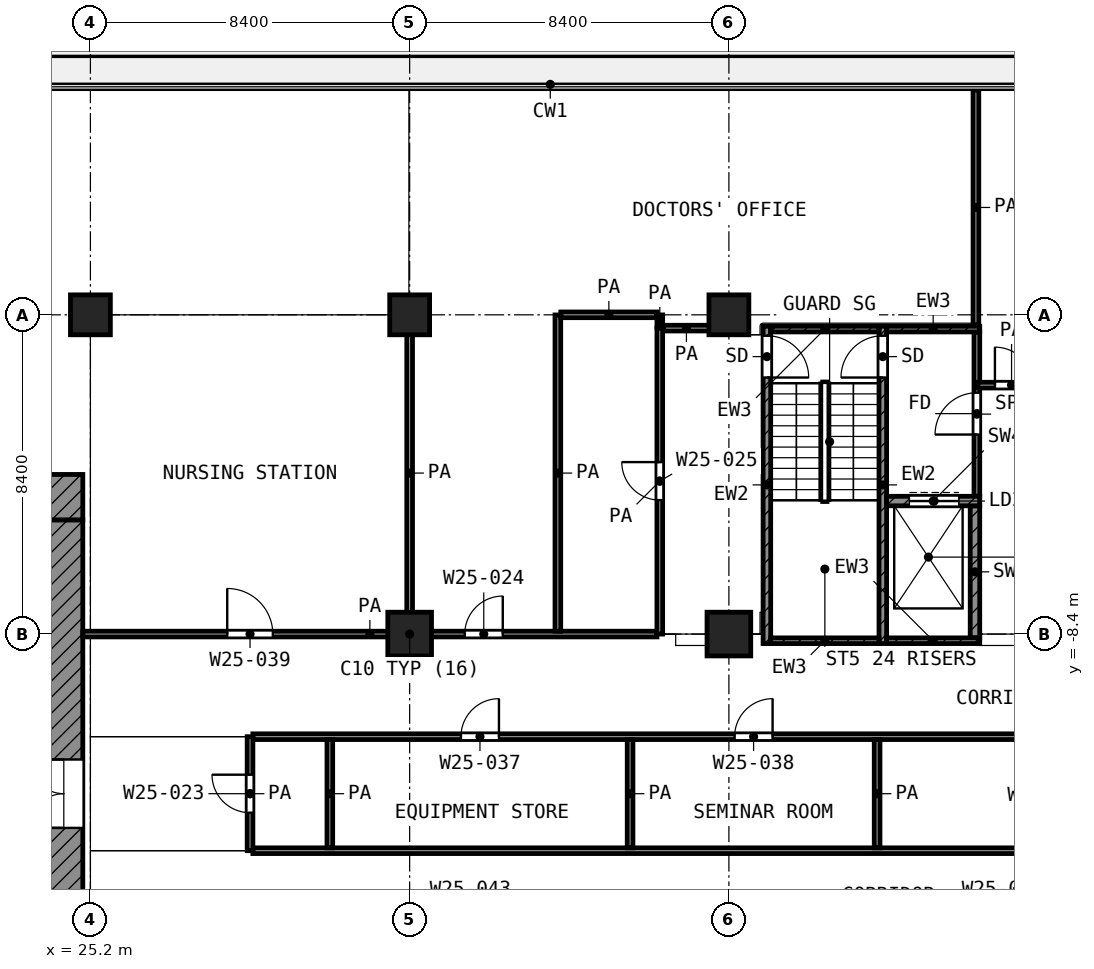
"""IFC4 building model, lengths in metres.
Left out: names, types, materials, properties, quantities, classifications, styles, units other than length and angle.
Written with IfcOpenShell. Run it as: python <this file> out.ifc"""

import sys

from ifc_helpers import new_model, si_unit, direction, frame, frame_2d, origin, origin_2d, place, context, subcontext, project, spatial, rectangle, extrude, element, fill, save


model = new_model("IFC4")
c1 = context("Model", 3, precision=1e-05, world=origin(), true_north=direction((0.0, 1.0)))
c2 = subcontext(c1, "Body", "Model", "MODEL_VIEW")
j1 = project(units=[si_unit("LENGTHUNIT", "METRE"), si_unit("PLANEANGLEUNIT", "RADIAN")], contexts=[c1])
p1 = place(None, origin())
s1 = spatial("IfcSite", under=j1, at=p1, CompositionType="ELEMENT")
p2 = place(p1, origin())
s2 = spatial("IfcBuilding", under=s1, at=p2, CompositionType="ELEMENT")
p3 = place(p2, frame((0.0, 0.0, 111.4)))
s3 = spatial("IfcBuildingStorey", under=s2, at=p3, CompositionType="ELEMENT", Elevation=111.4)
for number, where, z_axis, x_axis in (
    (1, (25.2, 0.0, 0.0), (0.0, 0.0, 1.0), (1.0, 0.0, 0.0)),
    (2, (33.6, 0.0, 0.0), (0.0, 0.0, 1.0), (1.0, 0.0, 0.0)),
    (3, (42.0, 0.0, 0.0), (0.0, 0.0, 1.0), (1.0, 0.0, 0.0)),
):
    element("IfcColumn", number, at=place(p3, frame(where, z_axis=z_axis, x_axis=x_axis)), inside=s3, PredefinedType="COLUMN", context=c2, shape_type="SweptSolid", body=[
        extrude(rectangle(XDim=1.05, YDim=1.05, at=origin_2d()), origin(), (0.0, 0.0, 1.0), 4.2),
    ])
for number, where, z_axis, x_axis in (
    (4, (33.6, -8.4, 0.0), (0.0, 0.0, 1.0), (1.0, 0.0, 0.0)),
    (5, (42.0, -8.4, 0.0), (0.0, 0.0, 1.0), (1.0, 0.0, 0.0)),
):
    element("IfcColumn", number, at=place(p3, frame(where, z_axis=z_axis, x_axis=x_axis)), inside=s3, PredefinedType="COLUMN", context=c2, shape_type="SweptSolid", body=[
        extrude(rectangle(XDim=1.15, YDim=1.15, at=origin_2d()), origin(), (0.0, 0.0, 1.0), 4.2),
    ])
p4 = place(p3, frame((4.2, -4.8, 0.0), z_axis=(0.0, 0.0, 1.0), x_axis=(1.0, 0.0, 0.0)))
e6 = element("IfcWall", 6, at=p4, inside=s3, PredefinedType="SHEAR", context=c2, shape_type="SweptSolid", body=[
    extrude(rectangle(XDim=20.8, YDim=1.2, at=frame_2d((10.4, 0.0))), origin(), (0.0, 0.0, 1.0), 3.6),
])
p5 = place(p4, frame((1.95, 0.0, 0.0)))
e7 = element("IfcOpeningElement", 7, at=p5, cuts=e6, PredefinedType="OPENING", context=c2, shape_type="SweptSolid", body=[
    extrude(rectangle(XDim=1.1, YDim=2.1, at=frame_2d((0.55, 1.05))), frame((0.0, 0.61, 0.0), z_axis=(0.0, -1.0, 0.0), x_axis=(1.0, 0.0, 0.0)), (0.0, 0.0, 1.0), 1.22),
])
p6 = place(p4, frame((17.95, 0.0, 0.0)))
e8 = element("IfcOpeningElement", 8, at=p6, cuts=e6, PredefinedType="OPENING", context=c2, shape_type="SweptSolid", body=[
    extrude(rectangle(XDim=1.1, YDim=2.1, at=frame_2d((0.55, 1.05))), frame((0.0, 0.61, 0.0), z_axis=(0.0, -1.0, 0.0), x_axis=(1.0, 0.0, 0.0)), (0.0, 0.0, 1.0), 1.22),
])
p7 = place(p3, frame((24.5, -24.0, 0.0), z_axis=(0.0, 0.0, 1.0), x_axis=(0.0, 1.0, 0.0)))
e9 = element("IfcWall", 9, at=p7, inside=s3, PredefinedType="SHEAR", context=c2, shape_type="SweptSolid", body=[
    extrude(rectangle(XDim=18.6, YDim=1.0, at=frame_2d((9.3, 0.0))), origin(), (0.0, 0.0, 1.0), 3.6),
])
p8 = place(p7, frame((10.5, 0.0, 0.0)))
e10 = element("IfcOpeningElement", 10, at=p8, cuts=e9, PredefinedType="OPENING", context=c2, shape_type="SweptSolid", body=[
    extrude(rectangle(XDim=1.8, YDim=2.1, at=frame_2d((0.9, 1.05))), frame((0.0, 0.51, 0.0), z_axis=(0.0, -1.0, 0.0), x_axis=(1.0, 0.0, 0.0)), (0.0, 0.0, 1.0), 1.02),
])
p9 = place(p3, frame((43.0, -8.65, 0.0), z_axis=(0.0, 0.0, 1.0), x_axis=(0.0, 1.0, 0.0)))
e11 = element("IfcWall", 11, at=p9, inside=s3, PredefinedType="SHEAR", context=c2, shape_type="SweptSolid", body=[
    extrude(rectangle(XDim=8.35, YDim=0.2, at=frame_2d((4.175, 0.0))), origin(), (0.0, 0.0, 1.0), 3.6),
])
p10 = place(p9, frame((7.0, 0.0, 0.0)))
e12 = element("IfcOpeningElement", 12, at=p10, cuts=e11, PredefinedType="OPENING", context=c2, shape_type="SweptSolid", body=[
    extrude(rectangle(XDim=1.1, YDim=2.1, at=frame_2d((0.55, 1.05))), frame((0.0, 0.11, 0.0), z_axis=(0.0, -1.0, 0.0), x_axis=(1.0, 0.0, 0.0)), (0.0, 0.0, 1.0), 0.22),
])
p11 = place(p3, frame((46.05, -8.65, 0.0), z_axis=(0.0, 0.0, 1.0), x_axis=(0.0, 1.0, 0.0)))
e13 = element("IfcWall", 13, at=p11, inside=s3, PredefinedType="SHEAR", context=c2, shape_type="SweptSolid", body=[
    extrude(rectangle(XDim=8.35, YDim=0.2, at=frame_2d((4.175, 0.0))), origin(), (0.0, 0.0, 1.0), 3.6),
])
p12 = place(p11, frame((7.0, 0.0, 0.0)))
e14 = element("IfcOpeningElement", 14, at=p12, cuts=e13, PredefinedType="OPENING", context=c2, shape_type="SweptSolid", body=[
    extrude(rectangle(XDim=1.1, YDim=2.1, at=frame_2d((0.55, 1.05))), frame((0.0, 0.11, 0.0), z_axis=(0.0, -1.0, 0.0), x_axis=(1.0, 0.0, 0.0)), (0.0, 0.0, 1.0), 0.22),
])
p13 = place(p3, frame((43.1, -0.375, 0.0), z_axis=(0.0, 0.0, 1.0), x_axis=(1.0, 0.0, 0.0)))
e15 = element("IfcWall", 15, at=p13, inside=s3, PredefinedType="SHEAR", context=c2, shape_type="SweptSolid", body=[
    extrude(rectangle(XDim=2.85, YDim=0.15, at=frame_2d((1.425, 0.0))), origin(), (0.0, 0.0, 1.0), 3.6),
])
p14 = place(p3, frame((46.15, -0.375, 0.0), z_axis=(0.0, 0.0, 1.0), x_axis=(1.0, 0.0, 0.0)))
e16 = element("IfcWall", 16, at=p14, inside=s3, PredefinedType="SHEAR", context=c2, shape_type="SweptSolid", body=[
    extrude(rectangle(XDim=2.45, YDim=0.15, at=frame_2d((1.225, 0.0))), origin(), (0.0, 0.0, 1.0), 3.6),
])
p15 = place(p3, frame((43.1, -8.575, 0.0), z_axis=(0.0, 0.0, 1.0), x_axis=(1.0, 0.0, 0.0)))
e17 = element("IfcWall", 17, at=p15, inside=s3, PredefinedType="SHEAR", context=c2, shape_type="SweptSolid", body=[
    extrude(rectangle(XDim=2.85, YDim=0.15, at=frame_2d((1.425, 0.0))), origin(), (0.0, 0.0, 1.0), 3.6),
])
p16 = place(p3, frame((46.15, -8.575, 0.0), z_axis=(0.0, 0.0, 1.0), x_axis=(1.0, 0.0, 0.0)))
e18 = element("IfcWall", 18, at=p16, inside=s3, PredefinedType="SHEAR", context=c2, shape_type="SweptSolid", body=[
    extrude(rectangle(XDim=2.45, YDim=0.15, at=frame_2d((1.225, 0.0))), origin(), (0.0, 0.0, 1.0), 3.6),
])
p17 = place(p3, frame((46.15, -4.9, 0.0), z_axis=(0.0, 0.0, 1.0), x_axis=(1.0, 0.0, 0.0)))
e19 = element("IfcWall", 19, at=p17, inside=s3, PredefinedType="SHEAR", context=c2, shape_type="SweptSolid", body=[
    extrude(rectangle(XDim=2.45, YDim=0.25, at=frame_2d((1.225, 0.0))), origin(), (0.0, 0.0, 1.0), 3.6),
])
p18 = place(p17, frame((0.6, 0.0, 0.0)))
e20 = element("IfcOpeningElement", 20, at=p18, cuts=e19, PredefinedType="OPENING", context=c2, shape_type="SweptSolid", body=[
    extrude(rectangle(XDim=1.3, YDim=2.1, at=frame_2d((0.65, 1.05))), frame((0.0, 0.135, 0.0), z_axis=(0.0, -1.0, 0.0), x_axis=(1.0, 0.0, 0.0)), (0.0, 0.0, 1.0), 0.27),
])
p19 = place(p3, frame((48.475, -8.5, 0.0), z_axis=(0.0, 0.0, 1.0), x_axis=(0.0, 1.0, 0.0)))
e21 = element("IfcWall", 21, at=p19, inside=s3, PredefinedType="SHEAR", context=c2, shape_type="SweptSolid", body=[
    extrude(rectangle(XDim=3.475, YDim=0.25, at=frame_2d((1.738, 0.0))), origin(), (0.0, 0.0, 1.0), 3.6),
])
p20 = place(p3, frame((48.525, -4.775, 0.0), z_axis=(0.0, 0.0, 1.0), x_axis=(0.0, 1.0, 0.0)))
e22 = element("IfcWall", 22, at=p20, inside=s3, PredefinedType="PARTITIONING", context=c2, shape_type="SweptSolid", body=[
    extrude(rectangle(XDim=4.325, YDim=0.15, at=frame_2d((2.163, 0.0))), origin(), (0.0, 0.0, 1.0), 3.6),
])
p21 = place(p20, frame((1.625, 0.0, 0.0)))
e23 = element("IfcOpeningElement", 23, at=p21, cuts=e22, PredefinedType="OPENING", context=c2, shape_type="SweptSolid", body=[
    extrude(rectangle(XDim=1.1, YDim=2.1, at=frame_2d((0.55, 1.05))), frame((0.0, 0.085, 0.0), z_axis=(0.0, -1.0, 0.0), x_axis=(1.0, 0.0, 0.0)), (0.0, 0.0, 1.0), 0.17),
])
p22 = place(p3, frame((29.475, -14.1, 0.0), z_axis=(0.0, 0.0, 1.0), x_axis=(1.0, 0.0, 0.0)))
e24 = element("IfcWall", 24, at=p22, inside=s3, PredefinedType="PARTITIONING", context=c2, shape_type="SweptSolid", body=[
    extrude(rectangle(XDim=43.35, YDim=0.15, at=frame_2d((21.675, 0.0))), origin(), (0.0, 0.0, 1.0), 3.6),
])
p23 = place(p22, frame((20.425, 0.0, 0.0)))
e25 = element("IfcOpeningElement", 25, at=p23, cuts=e24, PredefinedType="OPENING", context=c2, shape_type="SweptSolid", body=[
    extrude(rectangle(XDim=1.0, YDim=2.1, at=frame_2d((0.5, 1.05))), frame((0.0, 0.085, 0.0), z_axis=(0.0, -1.0, 0.0), x_axis=(1.0, 0.0, 0.0)), (0.0, 0.0, 1.0), 0.17),
])
p24 = place(p3, frame((29.475, -11.1, 0.0), z_axis=(0.0, 0.0, 1.0), x_axis=(1.0, 0.0, 0.0)))
e26 = element("IfcWall", 26, at=p24, inside=s3, PredefinedType="PARTITIONING", context=c2, shape_type="SweptSolid", body=[
    extrude(rectangle(XDim=43.35, YDim=0.15, at=frame_2d((21.675, 0.0))), origin(), (0.0, 0.0, 1.0), 3.6),
])
p25 = place(p24, frame((28.675, 0.0, 0.0)))
e27 = element("IfcOpeningElement", 27, at=p25, cuts=e26, PredefinedType="OPENING", context=c2, shape_type="SweptSolid", body=[
    extrude(rectangle(XDim=1.0, YDim=2.1, at=frame_2d((0.5, 1.05))), frame((0.0, 0.085, 0.0), z_axis=(0.0, -1.0, 0.0), x_axis=(1.0, 0.0, 0.0)), (0.0, 0.0, 1.0), 0.17),
])
p26 = place(p24, frame((34.875, 0.0, 0.0)))
e28 = element("IfcOpeningElement", 28, at=p26, cuts=e26, PredefinedType="OPENING", context=c2, shape_type="SweptSolid", body=[
    extrude(rectangle(XDim=0.9, YDim=2.1, at=frame_2d((0.45, 1.05))), frame((0.0, 0.085, 0.0), z_axis=(0.0, -1.0, 0.0), x_axis=(1.0, 0.0, 0.0)), (0.0, 0.0, 1.0), 0.17),
])
p27 = place(p24, frame((40.075, 0.0, 0.0)))
e29 = element("IfcOpeningElement", 29, at=p27, cuts=e26, PredefinedType="OPENING", context=c2, shape_type="SweptSolid", body=[
    extrude(rectangle(XDim=1.0, YDim=2.1, at=frame_2d((0.5, 1.05))), frame((0.0, 0.085, 0.0), z_axis=(0.0, -1.0, 0.0), x_axis=(1.0, 0.0, 0.0)), (0.0, 0.0, 1.0), 0.17),
])
p28 = place(p24, frame((5.475, 0.0, 0.0)))
e30 = element("IfcOpeningElement", 30, at=p28, cuts=e26, PredefinedType="OPENING", context=c2, shape_type="SweptSolid", body=[
    extrude(rectangle(XDim=1.0, YDim=2.1, at=frame_2d((0.5, 1.05))), frame((0.0, 0.085, 0.0), z_axis=(0.0, -1.0, 0.0), x_axis=(1.0, 0.0, 0.0)), (0.0, 0.0, 1.0), 0.17),
])
p29 = place(p24, frame((12.675, 0.0, 0.0)))
e31 = element("IfcOpeningElement", 31, at=p29, cuts=e26, PredefinedType="OPENING", context=c2, shape_type="SweptSolid", body=[
    extrude(rectangle(XDim=1.0, YDim=2.1, at=frame_2d((0.5, 1.05))), frame((0.0, 0.085, 0.0), z_axis=(0.0, -1.0, 0.0), x_axis=(1.0, 0.0, 0.0)), (0.0, 0.0, 1.0), 0.17),
])
p30 = place(p3, frame((25.0, -8.4, 0.0), z_axis=(0.0, 0.0, 1.0), x_axis=(1.0, 0.0, 0.0)))
e32 = element("IfcWall", 32, at=p30, inside=s3, PredefinedType="PARTITIONING", context=c2, shape_type="SweptSolid", body=[
    extrude(rectangle(XDim=15.107, YDim=0.15, at=frame_2d((7.553, 0.0))), origin(), (0.0, 0.0, 1.0), 3.6),
])
p31 = place(p30, frame((3.8, 0.0, 0.0)))
e33 = element("IfcOpeningElement", 33, at=p31, cuts=e32, PredefinedType="OPENING", context=c2, shape_type="SweptSolid", body=[
    extrude(rectangle(XDim=1.2, YDim=2.1, at=frame_2d((0.6, 1.05))), frame((0.0, 0.085, 0.0), z_axis=(0.0, -1.0, 0.0), x_axis=(1.0, 0.0, 0.0)), (0.0, 0.0, 1.0), 0.17),
])
p32 = place(p30, frame((10.05, 0.0, 0.0)))
e34 = element("IfcOpeningElement", 34, at=p32, cuts=e32, PredefinedType="OPENING", context=c2, shape_type="SweptSolid", body=[
    extrude(rectangle(XDim=1.0, YDim=2.1, at=frame_2d((0.5, 1.05))), frame((0.0, 0.085, 0.0), z_axis=(0.0, -1.0, 0.0), x_axis=(1.0, 0.0, 0.0)), (0.0, 0.0, 1.0), 0.17),
])
p33 = place(p3, frame((48.55, -1.85, 0.0), z_axis=(0.0, 0.0, 1.0), x_axis=(1.0, 0.0, 0.0)))
e35 = element("IfcWall", 35, at=p33, inside=s3, PredefinedType="PARTITIONING", context=c2, shape_type="SweptSolid", body=[
    extrude(rectangle(XDim=1.775, YDim=0.15, at=frame_2d((0.887, 0.0))), origin(), (0.0, 0.0, 1.0), 3.6),
])
p34 = place(p33, frame((0.45, 0.0, 0.0)))
e36 = element("IfcOpeningElement", 36, at=p34, cuts=e35, PredefinedType="OPENING", context=c2, shape_type="SweptSolid", body=[
    extrude(rectangle(XDim=1.0, YDim=2.1, at=frame_2d((0.5, 1.05))), frame((0.0, 0.085, 0.0), z_axis=(0.0, -1.0, 0.0), x_axis=(1.0, 0.0, 0.0)), (0.0, 0.0, 1.0), 0.17),
])
p35 = place(p3, frame((40.277, -0.35, 0.0), z_axis=(0.0, 0.0, 1.0), x_axis=(1.0, 0.0, 0.0)))
e37 = element("IfcWall", 37, at=p35, inside=s3, PredefinedType="PARTITIONING", context=c2, shape_type="SweptSolid", body=[
    extrude(rectangle(XDim=1.211, YDim=0.15, at=frame_2d((0.605, 0.0))), origin(), (0.0, 0.0, 1.0), 3.6),
])
p36 = place(p3, frame((37.578, 0.0, 0.0), z_axis=(0.0, 0.0, 1.0), x_axis=(1.0, 0.0, 0.0)))
e38 = element("IfcWall", 38, at=p36, inside=s3, PredefinedType="PARTITIONING", context=c2, shape_type="SweptSolid", body=[
    extrude(rectangle(XDim=2.527, YDim=0.15, at=frame_2d((1.264, 0.0))), origin(), (0.0, 0.0, 1.0), 3.6),
])
p37 = place(p3, frame((29.4, -14.1, 0.0), z_axis=(0.0, 0.0, 1.0), x_axis=(0.0, 1.0, 0.0)))
e39 = element("IfcWall", 39, at=p37, inside=s3, PredefinedType="PARTITIONING", context=c2, shape_type="SweptSolid", body=[
    extrude(rectangle(XDim=3.0, YDim=0.15, at=frame_2d((1.5, 0.0))), origin(), (0.0, 0.0, 1.0), 3.6),
])
p38 = place(p37, frame((1.0, 0.0, 0.0)))
e40 = element("IfcOpeningElement", 40, at=p38, cuts=e39, PredefinedType="OPENING", context=c2, shape_type="SweptSolid", body=[
    extrude(rectangle(XDim=1.0, YDim=2.1, at=frame_2d((0.5, 1.05))), frame((0.0, 0.085, 0.0), z_axis=(0.0, -1.0, 0.0), x_axis=(1.0, 0.0, 0.0)), (0.0, 0.0, 1.0), 0.17),
])
p39 = place(p3, frame((31.5, -14.025, 0.0), z_axis=(0.0, 0.0, 1.0), x_axis=(0.0, 1.0, 0.0)))
e41 = element("IfcWall", 41, at=p39, inside=s3, PredefinedType="PARTITIONING", context=c2, shape_type="SweptSolid", body=[
    extrude(rectangle(XDim=2.85, YDim=0.15, at=frame_2d((1.425, 0.0))), origin(), (0.0, 0.0, 1.0), 3.6),
])
for number, where, z_axis, x_axis in (
    (42, (33.6, -8.325, 0.0), (0.0, 0.0, 1.0), (0.0, 1.0, 0.0)),
    (43, (37.5, -8.325, 0.0), (0.0, 0.0, 1.0), (0.0, 1.0, 0.0)),
):
    element("IfcWall", number, at=place(p3, frame(where, z_axis=z_axis, x_axis=x_axis)), inside=s3, PredefinedType="PARTITIONING", context=c2, shape_type="SweptSolid", body=[
        extrude(rectangle(XDim=8.322, YDim=0.15, at=frame_2d((4.161, 0.0))), origin(), (0.0, 0.0, 1.0), 3.6),
    ])
p40 = place(p3, frame((39.4, -14.025, 0.0), z_axis=(0.0, 0.0, 1.0), x_axis=(0.0, 1.0, 0.0)))
e44 = element("IfcWall", 44, at=p40, inside=s3, PredefinedType="PARTITIONING", context=c2, shape_type="SweptSolid", body=[
    extrude(rectangle(XDim=2.85, YDim=0.15, at=frame_2d((1.425, 0.0))), origin(), (0.0, 0.0, 1.0), 3.6),
])
p41 = place(p3, frame((40.182, -8.4, 0.0), z_axis=(0.0, 0.0, 1.0), x_axis=(0.0, 1.0, 0.0)))
e45 = element("IfcWall", 45, at=p41, inside=s3, PredefinedType="PARTITIONING", context=c2, shape_type="SweptSolid", body=[
    extrude(rectangle(XDim=8.05, YDim=0.15, at=frame_2d((4.025, 0.0))), origin(), (0.0, 0.0, 1.0), 3.6),
])
p42 = place(p41, frame((3.525, 0.0, 0.0)))
e46 = element("IfcOpeningElement", 46, at=p42, cuts=e45, PredefinedType="OPENING", context=c2, shape_type="SweptSolid", body=[
    extrude(rectangle(XDim=1.0, YDim=2.1, at=frame_2d((0.5, 1.05))), frame((0.0, 0.085, 0.0), z_axis=(0.0, -1.0, 0.0), x_axis=(1.0, 0.0, 0.0)), (0.0, 0.0, 1.0), 0.17),
])
p43 = place(p3, frame((40.182, -0.33, 0.0), z_axis=(0.0, 0.0, 1.0), x_axis=(0.0, 1.0, 0.0)))
e47 = element("IfcWall", 47, at=p43, inside=s3, PredefinedType="PARTITIONING", context=c2, shape_type="SweptSolid", body=[
    extrude(rectangle(XDim=0.328, YDim=0.15, at=frame_2d((0.164, 0.0))), origin(), (0.0, 0.0, 1.0), 3.6),
])
p44 = place(p3, frame((45.9, -14.025, 0.0), z_axis=(0.0, 0.0, 1.0), x_axis=(0.0, 1.0, 0.0)))
e48 = element("IfcWall", 48, at=p44, inside=s3, PredefinedType="PARTITIONING", context=c2, shape_type="SweptSolid", body=[
    extrude(rectangle(XDim=2.85, YDim=0.15, at=frame_2d((1.425, 0.0))), origin(), (0.0, 0.0, 1.0), 3.6),
])
p45 = place(p3, frame((48.5, -0.27, 0.0), z_axis=(0.0, 0.0, 1.0), x_axis=(0.0, 1.0, 0.0)))
e49 = element("IfcWall", 49, at=p45, inside=s3, PredefinedType="PARTITIONING", context=c2, shape_type="SweptSolid", body=[
    extrude(rectangle(XDim=6.19, YDim=0.15, at=frame_2d((3.095, 0.0))), origin(), (0.0, 0.0, 1.0), 3.6),
])
p46 = place(p8, origin())
e50 = element("IfcDoor", 50, at=p46, inside=s3, OperationType="DOUBLE_DOOR_SINGLE_SWING", PredefinedType="DOOR", context=c2, shape_type="SweptSolid", body=[
    extrude(rectangle(XDim=1.8, YDim=2.1, at=frame_2d((0.9, 1.05))), frame((0.0, 0.025, 0.0), z_axis=(0.0, -1.0, 0.0), x_axis=(1.0, 0.0, 0.0)), (0.0, 0.0, 1.0), 0.05),
])
fill(e10, e50)
p47 = place(p10, frame((1.1, 0.0, 0.0), z_axis=(0.0, 0.0, 1.0), x_axis=(-1.0, 0.0, 0.0)))
e51 = element("IfcDoor", 51, at=p47, inside=s3, OperationType="SINGLE_SWING_LEFT", PredefinedType="DOOR", context=c2, shape_type="SweptSolid", body=[
    extrude(rectangle(XDim=1.1, YDim=2.1, at=frame_2d((0.55, 1.05))), frame((0.0, 0.025, 0.0), z_axis=(0.0, -1.0, 0.0), x_axis=(1.0, 0.0, 0.0)), (0.0, 0.0, 1.0), 0.05),
])
fill(e12, e51)
p48 = place(p12, origin())
e52 = element("IfcDoor", 52, at=p48, inside=s3, OperationType="SINGLE_SWING_LEFT", PredefinedType="DOOR", context=c2, shape_type="SweptSolid", body=[
    extrude(rectangle(XDim=1.1, YDim=2.1, at=frame_2d((0.55, 1.05))), frame((0.0, 0.025, 0.0), z_axis=(0.0, -1.0, 0.0), x_axis=(1.0, 0.0, 0.0)), (0.0, 0.0, 1.0), 0.05),
])
fill(e14, e52)
p49 = place(p18, origin())
e53 = element("IfcDoor", 53, at=p49, inside=s3, OperationType="DOUBLE_DOOR_SLIDING", PredefinedType="DOOR", context=c2, shape_type="SweptSolid", body=[
    extrude(rectangle(XDim=1.3, YDim=2.1, at=frame_2d((0.65, 1.05))), frame((0.0, 0.025, 0.0), z_axis=(0.0, -1.0, 0.0), x_axis=(1.0, 0.0, 0.0)), (0.0, 0.0, 1.0), 0.05),
])
fill(e20, e53)
p50 = place(p21, origin())
e54 = element("IfcDoor", 54, at=p50, inside=s3, OperationType="SINGLE_SWING_LEFT", PredefinedType="DOOR", context=c2, shape_type="SweptSolid", body=[
    extrude(rectangle(XDim=1.1, YDim=2.1, at=frame_2d((0.55, 1.05))), frame((0.0, 0.025, 0.0), z_axis=(0.0, -1.0, 0.0), x_axis=(1.0, 0.0, 0.0)), (0.0, 0.0, 1.0), 0.05),
])
fill(e23, e54)
p51 = place(p31, origin())
e55 = element("IfcDoor", 55, at=p51, inside=s3, OperationType="SINGLE_SWING_LEFT", PredefinedType="DOOR", context=c2, shape_type="SweptSolid", body=[
    extrude(rectangle(XDim=1.2, YDim=2.1, at=frame_2d((0.6, 1.05))), frame((0.0, 0.025, 0.0), z_axis=(0.0, -1.0, 0.0), x_axis=(1.0, 0.0, 0.0)), (0.0, 0.0, 1.0), 0.05),
])
fill(e33, e55)
p52 = place(p32, origin())
e56 = element("IfcDoor", 56, at=p52, inside=s3, OperationType="SINGLE_SWING_RIGHT", PredefinedType="DOOR", context=c2, shape_type="SweptSolid", body=[
    extrude(rectangle(XDim=1.0, YDim=2.1, at=frame_2d((0.5, 1.05))), frame((0.0, 0.025, 0.0), z_axis=(0.0, -1.0, 0.0), x_axis=(1.0, 0.0, 0.0)), (0.0, 0.0, 1.0), 0.05),
])
fill(e34, e56)
p53 = place(p42, origin())
e57 = element("IfcDoor", 57, at=p53, inside=s3, OperationType="SINGLE_SWING_RIGHT", PredefinedType="DOOR", context=c2, shape_type="SweptSolid", body=[
    extrude(rectangle(XDim=1.0, YDim=2.1, at=frame_2d((0.5, 1.05))), frame((0.0, 0.025, 0.0), z_axis=(0.0, -1.0, 0.0), x_axis=(1.0, 0.0, 0.0)), (0.0, 0.0, 1.0), 0.05),
])
fill(e46, e57)
p54 = place(p34, origin())
e58 = element("IfcDoor", 58, at=p54, inside=s3, OperationType="SINGLE_SWING_LEFT", PredefinedType="DOOR", context=c2, shape_type="SweptSolid", body=[
    extrude(rectangle(XDim=1.0, YDim=2.1, at=frame_2d((0.5, 1.05))), frame((0.0, 0.025, 0.0), z_axis=(0.0, -1.0, 0.0), x_axis=(1.0, 0.0, 0.0)), (0.0, 0.0, 1.0), 0.05),
])
fill(e36, e58)
p55 = place(p38, origin())
e59 = element("IfcDoor", 59, at=p55, inside=s3, OperationType="SINGLE_SWING_RIGHT", PredefinedType="DOOR", context=c2, shape_type="SweptSolid", body=[
    extrude(rectangle(XDim=1.0, YDim=2.1, at=frame_2d((0.5, 1.05))), frame((0.0, 0.025, 0.0), z_axis=(0.0, -1.0, 0.0), x_axis=(1.0, 0.0, 0.0)), (0.0, 0.0, 1.0), 0.05),
])
fill(e40, e59)
p56 = place(p28, origin())
e60 = element("IfcDoor", 60, at=p56, inside=s3, OperationType="SINGLE_SWING_RIGHT", PredefinedType="DOOR", context=c2, shape_type="SweptSolid", body=[
    extrude(rectangle(XDim=1.0, YDim=2.1, at=frame_2d((0.5, 1.05))), frame((0.0, 0.025, 0.0), z_axis=(0.0, -1.0, 0.0), x_axis=(1.0, 0.0, 0.0)), (0.0, 0.0, 1.0), 0.05),
])
fill(e30, e60)
p57 = place(p29, origin())
e61 = element("IfcDoor", 61, at=p57, inside=s3, OperationType="SINGLE_SWING_RIGHT", PredefinedType="DOOR", context=c2, shape_type="SweptSolid", body=[
    extrude(rectangle(XDim=1.0, YDim=2.1, at=frame_2d((0.5, 1.05))), frame((0.0, 0.025, 0.0), z_axis=(0.0, -1.0, 0.0), x_axis=(1.0, 0.0, 0.0)), (0.0, 0.0, 1.0), 0.05),
])
fill(e31, e61)
save(model, sys.argv[1])
